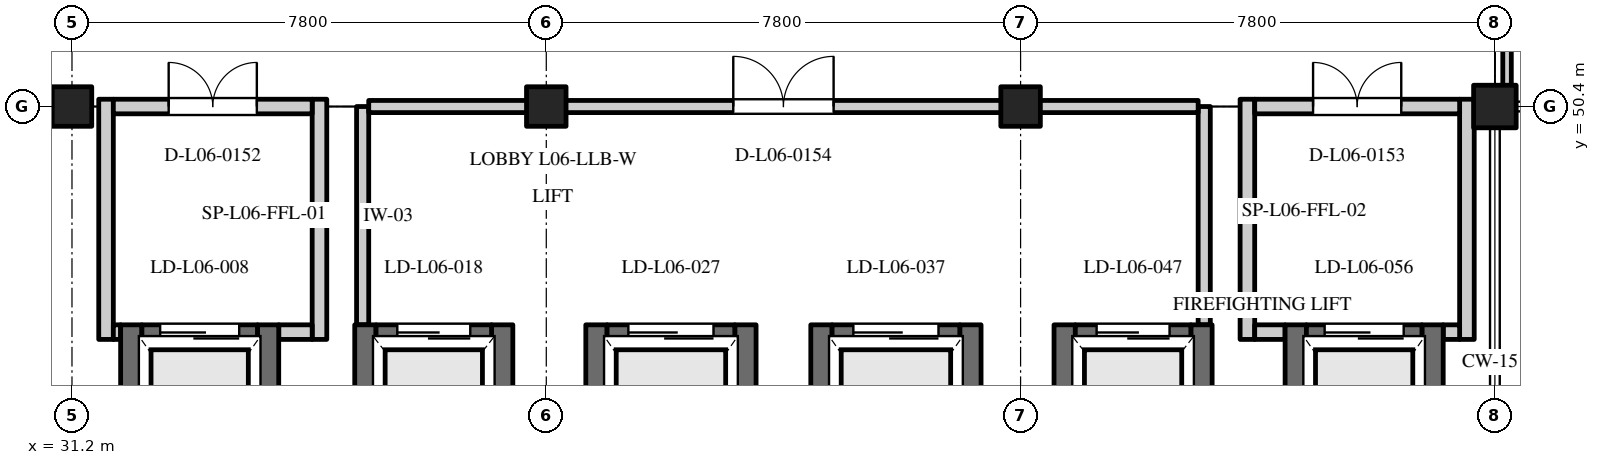
"""IFC4 building model, lengths in metres.
Left out: names, types, materials, properties, quantities, classifications, styles, units other than length and angle.
Written with IfcOpenShell. Run it as: python <this file> out.ifc"""

import sys

from ifc_helpers import new_model, si_unit, direction, frame, frame_2d, origin, origin_2d, place, context, subcontext, project, spatial, rectangle, extrude, element, fill, save


model = new_model("IFC4")
c1 = context("Model", 3, precision=1e-05, world=origin(), true_north=direction((0.0, 1.0)))
c2 = subcontext(c1, "Body", "Model", "MODEL_VIEW")
j1 = project(units=[si_unit("LENGTHUNIT", "METRE"), si_unit("PLANEANGLEUNIT", "RADIAN")], contexts=[c1])
p1 = place(None, origin())
s1 = spatial("IfcSite", under=j1, at=p1, CompositionType="ELEMENT")
p2 = place(p1, origin())
s2 = spatial("IfcBuilding", under=s1, at=p2, CompositionType="ELEMENT")
p3 = place(p2, frame((0.0, 0.0, 26.1)))
s3 = spatial("IfcBuildingStorey", under=s2, at=p3, CompositionType="ELEMENT", Elevation=26.1)
for number, where, z_axis, x_axis in (
    (1, (31.2, 50.4, 0.0), (0.0, 0.0, 1.0), (1.0, 0.0, 0.0)),
    (2, (39.0, 50.4, 0.0), (0.0, 0.0, 1.0), (1.0, 0.0, 0.0)),
    (3, (46.8, 50.4, 0.0), (0.0, 0.0, 1.0), (1.0, 0.0, 0.0)),
):
    element("IfcColumn", number, at=place(p3, frame(where, z_axis=z_axis, x_axis=x_axis)), inside=s3, PredefinedType="COLUMN", context=c2, shape_type="SweptSolid", body=[
        extrude(rectangle(XDim=0.65, YDim=0.65, at=origin_2d()), origin(), (0.0, 0.0, 1.0), 3.6),
    ])
p4 = place(p3, frame((54.6, 50.4, 0.0), z_axis=(0.0, 0.0, 1.0), x_axis=(1.0, 0.0, 0.0)))
e4 = element("IfcColumn", 4, at=p4, inside=s3, PredefinedType="COLUMN", context=c2, shape_type="SweptSolid", body=[
    extrude(rectangle(XDim=0.7, YDim=0.7, at=origin_2d()), origin(), (0.0, 0.0, 1.0), 3.6),
])
for number, where, z_axis, x_axis in (
    (5, (32.175, 43.06, 0.0), (0.0, 0.0, 1.0), (0.0, 1.0, 0.0)),
    (6, (34.425, 43.06, 0.0), (0.0, 0.0, 1.0), (0.0, 1.0, 0.0)),
):
    element("IfcWall", number, at=place(p3, frame(where, z_axis=z_axis, x_axis=x_axis)), inside=s3, PredefinedType="SHEAR", context=c2, shape_type="SweptSolid", body=[
        extrude(rectangle(XDim=3.75, YDim=0.35, at=frame_2d((1.875, 0.0))), origin(), (0.0, 0.0, 1.0), 3.6),
    ])
p5 = place(p3, frame((32.35, 46.635, 0.0), z_axis=(0.0, 0.0, 1.0), x_axis=(1.0, 0.0, 0.0)))
e7 = element("IfcWall", 7, at=p5, inside=s3, PredefinedType="SHEAR", context=c2, shape_type="SweptSolid", body=[
    extrude(rectangle(XDim=1.9, YDim=0.35, at=frame_2d((0.95, 0.0))), origin(), (0.0, 0.0, 1.0), 3.3),
])
p6 = place(p5, frame((0.3, 0.0, 0.0)))
e8 = element("IfcOpeningElement", 8, at=p6, cuts=e7, PredefinedType="OPENING", context=c2, shape_type="SweptSolid", body=[
    extrude(rectangle(XDim=1.3, YDim=2.2, at=frame_2d((0.65, 1.1))), frame((0.0, 0.187, 0.0), z_axis=(0.0, -1.0, 0.0), x_axis=(1.0, 0.0, 0.0)), (0.0, 0.0, 1.0), 0.374),
])
for number, where, z_axis, x_axis in (
    (9, (36.025, 43.36, 0.0), (0.0, 0.0, 1.0), (0.0, 1.0, 0.0)),
    (10, (38.275, 43.36, 0.0), (0.0, 0.0, 1.0), (0.0, 1.0, 0.0)),
):
    element("IfcWall", number, at=place(p3, frame(where, z_axis=z_axis, x_axis=x_axis)), inside=s3, PredefinedType="SHEAR", context=c2, shape_type="SweptSolid", body=[
        extrude(rectangle(XDim=3.45, YDim=0.35, at=frame_2d((1.725, 0.0))), origin(), (0.0, 0.0, 1.0), 3.6),
    ])
p7 = place(p3, frame((36.2, 46.635, 0.0), z_axis=(0.0, 0.0, 1.0), x_axis=(1.0, 0.0, 0.0)))
e11 = element("IfcWall", 11, at=p7, inside=s3, PredefinedType="SHEAR", context=c2, shape_type="SweptSolid", body=[
    extrude(rectangle(XDim=1.9, YDim=0.35, at=frame_2d((0.95, 0.0))), origin(), (0.0, 0.0, 1.0), 3.3),
])
p8 = place(p7, frame((0.35, 0.0, 0.0)))
e12 = element("IfcOpeningElement", 12, at=p8, cuts=e11, PredefinedType="OPENING", context=c2, shape_type="SweptSolid", body=[
    extrude(rectangle(XDim=1.2, YDim=2.2, at=frame_2d((0.6, 1.1))), frame((0.0, 0.187, 0.0), z_axis=(0.0, -1.0, 0.0), x_axis=(1.0, 0.0, 0.0)), (0.0, 0.0, 1.0), 0.374),
])
for number, where, z_axis, x_axis in (
    (13, (39.825, 42.76, 0.0), (0.0, 0.0, 1.0), (0.0, 1.0, 0.0)),
    (14, (42.275, 42.76, 0.0), (0.0, 0.0, 1.0), (0.0, 1.0, 0.0)),
):
    element("IfcWall", number, at=place(p3, frame(where, z_axis=z_axis, x_axis=x_axis)), inside=s3, PredefinedType="SHEAR", context=c2, shape_type="SweptSolid", body=[
        extrude(rectangle(XDim=4.05, YDim=0.35, at=frame_2d((2.025, 0.0))), origin(), (0.0, 0.0, 1.0), 3.6),
    ])
p9 = place(p3, frame((40.0, 46.635, 0.0), z_axis=(0.0, 0.0, 1.0), x_axis=(1.0, 0.0, 0.0)))
e15 = element("IfcWall", 15, at=p9, inside=s3, PredefinedType="SHEAR", context=c2, shape_type="SweptSolid", body=[
    extrude(rectangle(XDim=2.1, YDim=0.35, at=frame_2d((1.05, 0.0))), origin(), (0.0, 0.0, 1.0), 3.3),
])
p10 = place(p9, frame((0.35, 0.0, 0.0)))
e16 = element("IfcOpeningElement", 16, at=p10, cuts=e15, PredefinedType="OPENING", context=c2, shape_type="SweptSolid", body=[
    extrude(rectangle(XDim=1.4, YDim=2.2, at=frame_2d((0.7, 1.1))), frame((0.0, 0.187, 0.0), z_axis=(0.0, -1.0, 0.0), x_axis=(1.0, 0.0, 0.0)), (0.0, 0.0, 1.0), 0.374),
])
for number, where, z_axis, x_axis in (
    (17, (43.525, 42.76, 0.0), (0.0, 0.0, 1.0), (0.0, 1.0, 0.0)),
    (18, (45.975, 42.76, 0.0), (0.0, 0.0, 1.0), (0.0, 1.0, 0.0)),
):
    element("IfcWall", number, at=place(p3, frame(where, z_axis=z_axis, x_axis=x_axis)), inside=s3, PredefinedType="SHEAR", context=c2, shape_type="SweptSolid", body=[
        extrude(rectangle(XDim=4.05, YDim=0.35, at=frame_2d((2.025, 0.0))), origin(), (0.0, 0.0, 1.0), 3.6),
    ])
p11 = place(p3, frame((43.7, 46.635, 0.0), z_axis=(0.0, 0.0, 1.0), x_axis=(1.0, 0.0, 0.0)))
e19 = element("IfcWall", 19, at=p11, inside=s3, PredefinedType="SHEAR", context=c2, shape_type="SweptSolid", body=[
    extrude(rectangle(XDim=2.1, YDim=0.35, at=frame_2d((1.05, 0.0))), origin(), (0.0, 0.0, 1.0), 3.3),
])
p12 = place(p11, frame((0.35, 0.0, 0.0)))
e20 = element("IfcOpeningElement", 20, at=p12, cuts=e19, PredefinedType="OPENING", context=c2, shape_type="SweptSolid", body=[
    extrude(rectangle(XDim=1.4, YDim=2.2, at=frame_2d((0.7, 1.1))), frame((0.0, 0.187, 0.0), z_axis=(0.0, -1.0, 0.0), x_axis=(1.0, 0.0, 0.0)), (0.0, 0.0, 1.0), 0.374),
])
for number, where, z_axis, x_axis in (
    (21, (47.525, 43.36, 0.0), (0.0, 0.0, 1.0), (0.0, 1.0, 0.0)),
    (22, (49.775, 43.36, 0.0), (0.0, 0.0, 1.0), (0.0, 1.0, 0.0)),
):
    element("IfcWall", number, at=place(p3, frame(where, z_axis=z_axis, x_axis=x_axis)), inside=s3, PredefinedType="SHEAR", context=c2, shape_type="SweptSolid", body=[
        extrude(rectangle(XDim=3.45, YDim=0.35, at=frame_2d((1.725, 0.0))), origin(), (0.0, 0.0, 1.0), 3.6),
    ])
p13 = place(p3, frame((47.7, 46.635, 0.0), z_axis=(0.0, 0.0, 1.0), x_axis=(1.0, 0.0, 0.0)))
e23 = element("IfcWall", 23, at=p13, inside=s3, PredefinedType="SHEAR", context=c2, shape_type="SweptSolid", body=[
    extrude(rectangle(XDim=1.9, YDim=0.35, at=frame_2d((0.95, 0.0))), origin(), (0.0, 0.0, 1.0), 3.3),
])
p14 = place(p13, frame((0.35, 0.0, 0.0)))
e24 = element("IfcOpeningElement", 24, at=p14, cuts=e23, PredefinedType="OPENING", context=c2, shape_type="SweptSolid", body=[
    extrude(rectangle(XDim=1.2, YDim=2.2, at=frame_2d((0.6, 1.1))), frame((0.0, 0.187, 0.0), z_axis=(0.0, -1.0, 0.0), x_axis=(1.0, 0.0, 0.0)), (0.0, 0.0, 1.0), 0.374),
])
for number, where, z_axis, x_axis in (
    (25, (51.325, 43.06, 0.0), (0.0, 0.0, 1.0), (0.0, 1.0, 0.0)),
    (26, (53.575, 43.06, 0.0), (0.0, 0.0, 1.0), (0.0, 1.0, 0.0)),
):
    element("IfcWall", number, at=place(p3, frame(where, z_axis=z_axis, x_axis=x_axis)), inside=s3, PredefinedType="SHEAR", context=c2, shape_type="SweptSolid", body=[
        extrude(rectangle(XDim=3.75, YDim=0.35, at=frame_2d((1.875, 0.0))), origin(), (0.0, 0.0, 1.0), 3.6),
    ])
p15 = place(p3, frame((51.5, 46.635, 0.0), z_axis=(0.0, 0.0, 1.0), x_axis=(1.0, 0.0, 0.0)))
e27 = element("IfcWall", 27, at=p15, inside=s3, PredefinedType="SHEAR", context=c2, shape_type="SweptSolid", body=[
    extrude(rectangle(XDim=1.9, YDim=0.35, at=frame_2d((0.95, 0.0))), origin(), (0.0, 0.0, 1.0), 3.3),
])
p16 = place(p15, frame((0.3, 0.0, 0.0)))
e28 = element("IfcOpeningElement", 28, at=p16, cuts=e27, PredefinedType="OPENING", context=c2, shape_type="SweptSolid", body=[
    extrude(rectangle(XDim=1.3, YDim=2.2, at=frame_2d((0.65, 1.1))), frame((0.0, 0.187, 0.0), z_axis=(0.0, -1.0, 0.0), x_axis=(1.0, 0.0, 0.0)), (0.0, 0.0, 1.0), 0.374),
])
for number, where, z_axis, x_axis in (
    (29, (31.76, 46.57, 0.0), (0.0, 0.0, 1.0), (0.0, 1.0, 0.0)),
    (30, (35.27, 46.57, 0.0), (0.0, 0.0, 1.0), (0.0, 1.0, 0.0)),
):
    element("IfcWall", number, at=place(p3, frame(where, z_axis=z_axis, x_axis=x_axis)), inside=s3, PredefinedType="STANDARD", context=c2, shape_type="SweptSolid", body=[
        extrude(rectangle(XDim=3.95, YDim=0.24, at=frame_2d((1.975, 0.0))), origin(), (0.0, 0.0, 1.0), 2.8),
    ])
p17 = place(p3, frame((31.88, 46.69, 0.0), z_axis=(0.0, 0.0, 1.0), x_axis=(1.0, 0.0, 0.0)))
e31 = element("IfcWall", 31, at=p17, inside=s3, PredefinedType="STANDARD", context=c2, shape_type="SweptSolid", body=[
    extrude(rectangle(XDim=0.12, YDim=0.24, at=frame_2d((0.06, 0.0))), origin(), (0.0, 0.0, 1.0), 2.8),
])
p18 = place(p3, frame((34.6, 46.69, 0.0), z_axis=(0.0, 0.0, 1.0), x_axis=(1.0, 0.0, 0.0)))
e32 = element("IfcWall", 32, at=p18, inside=s3, PredefinedType="STANDARD", context=c2, shape_type="SweptSolid", body=[
    extrude(rectangle(XDim=0.55, YDim=0.24, at=frame_2d((0.275, 0.0))), origin(), (0.0, 0.0, 1.0), 2.8),
])
p19 = place(p3, frame((31.88, 50.4, 0.0), z_axis=(0.0, 0.0, 1.0), x_axis=(1.0, 0.0, 0.0)))
e33 = element("IfcWall", 33, at=p19, inside=s3, PredefinedType="STANDARD", context=c2, shape_type="SweptSolid", body=[
    extrude(rectangle(XDim=3.27, YDim=0.24, at=frame_2d((1.635, 0.0))), origin(), (0.0, 0.0, 1.0), 2.8),
])
p20 = place(p19, frame((0.91, 0.0, 0.0)))
e34 = element("IfcOpeningElement", 34, at=p20, cuts=e33, PredefinedType="OPENING", context=c2, shape_type="SweptSolid", body=[
    extrude(rectangle(XDim=1.45, YDim=2.2, at=frame_2d((0.725, 1.1))), frame((0.0, 0.132, 0.0), z_axis=(0.0, -1.0, 0.0), x_axis=(1.0, 0.0, 0.0)), (0.0, 0.0, 1.0), 0.264),
])
for number, where, z_axis, x_axis in (
    (35, (50.53, 46.57, 0.0), (0.0, 0.0, 1.0), (0.0, 1.0, 0.0)),
    (36, (54.14, 46.57, 0.0), (0.0, 0.0, 1.0), (0.0, 1.0, 0.0)),
):
    element("IfcWall", number, at=place(p3, frame(where, z_axis=z_axis, x_axis=x_axis)), inside=s3, PredefinedType="STANDARD", context=c2, shape_type="SweptSolid", body=[
        extrude(rectangle(XDim=3.95, YDim=0.24, at=frame_2d((1.975, 0.0))), origin(), (0.0, 0.0, 1.0), 2.8),
    ])
p21 = place(p3, frame((50.65, 46.69, 0.0), z_axis=(0.0, 0.0, 1.0), x_axis=(1.0, 0.0, 0.0)))
e37 = element("IfcWall", 37, at=p21, inside=s3, PredefinedType="STANDARD", context=c2, shape_type="SweptSolid", body=[
    extrude(rectangle(XDim=0.5, YDim=0.24, at=frame_2d((0.25, 0.0))), origin(), (0.0, 0.0, 1.0), 2.8),
])
p22 = place(p3, frame((53.75, 46.69, 0.0), z_axis=(0.0, 0.0, 1.0), x_axis=(1.0, 0.0, 0.0)))
e38 = element("IfcWall", 38, at=p22, inside=s3, PredefinedType="STANDARD", context=c2, shape_type="SweptSolid", body=[
    extrude(rectangle(XDim=0.27, YDim=0.24, at=frame_2d((0.135, 0.0))), origin(), (0.0, 0.0, 1.0), 2.8),
])
p23 = place(p3, frame((50.65, 50.4, 0.0), z_axis=(0.0, 0.0, 1.0), x_axis=(1.0, 0.0, 0.0)))
e39 = element("IfcWall", 39, at=p23, inside=s3, PredefinedType="STANDARD", context=c2, shape_type="SweptSolid", body=[
    extrude(rectangle(XDim=3.37, YDim=0.24, at=frame_2d((1.685, 0.0))), origin(), (0.0, 0.0, 1.0), 2.8),
])
p24 = place(p23, frame((0.96, 0.0, 0.0)))
e40 = element("IfcOpeningElement", 40, at=p24, cuts=e39, PredefinedType="OPENING", context=c2, shape_type="SweptSolid", body=[
    extrude(rectangle(XDim=1.45, YDim=2.2, at=frame_2d((0.725, 1.1))), frame((0.0, 0.132, 0.0), z_axis=(0.0, -1.0, 0.0), x_axis=(1.0, 0.0, 0.0)), (0.0, 0.0, 1.0), 0.264),
])
for number, where, z_axis, x_axis in (
    (41, (35.98, 46.81, 0.0), (0.0, 0.0, 1.0), (0.0, 1.0, 0.0)),
    (42, (49.82, 46.81, 0.0), (0.0, 0.0, 1.0), (0.0, 1.0, 0.0)),
):
    element("IfcWall", number, at=place(p3, frame(where, z_axis=z_axis, x_axis=x_axis)), inside=s3, PredefinedType="STANDARD", context=c2, shape_type="SweptSolid", body=[
        extrude(rectangle(XDim=3.59, YDim=0.2, at=frame_2d((1.795, 0.0))), origin(), (0.0, 0.0, 1.0), 2.8),
    ])
p25 = place(p3, frame((36.08, 50.4, 0.0), z_axis=(0.0, 0.0, 1.0), x_axis=(1.0, 0.0, 0.0)))
e43 = element("IfcWall", 43, at=p25, inside=s3, PredefinedType="STANDARD", context=c2, shape_type="SweptSolid", body=[
    extrude(rectangle(XDim=13.64, YDim=0.2, at=frame_2d((6.82, 0.0))), origin(), (0.0, 0.0, 1.0), 2.8),
])
p26 = place(p25, frame((5.995, 0.0, 0.0)))
e44 = element("IfcOpeningElement", 44, at=p26, cuts=e43, PredefinedType="OPENING", context=c2, shape_type="SweptSolid", body=[
    extrude(rectangle(XDim=1.65, YDim=2.25, at=frame_2d((0.825, 1.125))), frame((0.0, 0.112, 0.0), z_axis=(0.0, -1.0, 0.0), x_axis=(1.0, 0.0, 0.0)), (0.0, 0.0, 1.0), 0.224),
])
p27 = place(p3, frame((54.8, 50.485, 0.0), z_axis=(0.0, 0.0, 1.0), x_axis=(0.0, 1.0, 0.0)))
e45 = element("IfcWall", 45, at=p27, inside=s3, PredefinedType="PARTITIONING", context=c2, shape_type="SweptSolid", body=[
    extrude(rectangle(XDim=3.56, YDim=0.14, at=frame_2d((1.78, 0.0))), origin(), (0.0, 0.0, 1.0), 2.65),
])
p28 = place(p6, origin())
e46 = element("IfcDoor", 46, at=p28, inside=s3, OperationType="SLIDING_TO_LEFT", PredefinedType="DOOR", context=c2, shape_type="SweptSolid", body=[
    extrude(rectangle(XDim=1.3, YDim=2.2, at=frame_2d((0.65, 1.1))), frame((0.0, 0.025, 0.0), z_axis=(0.0, -1.0, 0.0), x_axis=(1.0, 0.0, 0.0)), (0.0, 0.0, 1.0), 0.05),
])
fill(e8, e46)
p29 = place(p8, origin())
e47 = element("IfcDoor", 47, at=p29, inside=s3, OperationType="SLIDING_TO_LEFT", PredefinedType="DOOR", context=c2, shape_type="SweptSolid", body=[
    extrude(rectangle(XDim=1.2, YDim=2.2, at=frame_2d((0.6, 1.1))), frame((0.0, 0.025, 0.0), z_axis=(0.0, -1.0, 0.0), x_axis=(1.0, 0.0, 0.0)), (0.0, 0.0, 1.0), 0.05),
])
fill(e12, e47)
p30 = place(p10, origin())
e48 = element("IfcDoor", 48, at=p30, inside=s3, OperationType="SLIDING_TO_LEFT", PredefinedType="DOOR", context=c2, shape_type="SweptSolid", body=[
    extrude(rectangle(XDim=1.4, YDim=2.2, at=frame_2d((0.7, 1.1))), frame((0.0, 0.025, 0.0), z_axis=(0.0, -1.0, 0.0), x_axis=(1.0, 0.0, 0.0)), (0.0, 0.0, 1.0), 0.05),
])
fill(e16, e48)
p31 = place(p12, origin())
e49 = element("IfcDoor", 49, at=p31, inside=s3, OperationType="SLIDING_TO_LEFT", PredefinedType="DOOR", context=c2, shape_type="SweptSolid", body=[
    extrude(rectangle(XDim=1.4, YDim=2.2, at=frame_2d((0.7, 1.1))), frame((0.0, 0.025, 0.0), z_axis=(0.0, -1.0, 0.0), x_axis=(1.0, 0.0, 0.0)), (0.0, 0.0, 1.0), 0.05),
])
fill(e20, e49)
p32 = place(p14, origin())
e50 = element("IfcDoor", 50, at=p32, inside=s3, OperationType="SLIDING_TO_LEFT", PredefinedType="DOOR", context=c2, shape_type="SweptSolid", body=[
    extrude(rectangle(XDim=1.2, YDim=2.2, at=frame_2d((0.6, 1.1))), frame((0.0, 0.025, 0.0), z_axis=(0.0, -1.0, 0.0), x_axis=(1.0, 0.0, 0.0)), (0.0, 0.0, 1.0), 0.05),
])
fill(e24, e50)
p33 = place(p16, origin())
e51 = element("IfcDoor", 51, at=p33, inside=s3, OperationType="SLIDING_TO_LEFT", PredefinedType="DOOR", context=c2, shape_type="SweptSolid", body=[
    extrude(rectangle(XDim=1.3, YDim=2.2, at=frame_2d((0.65, 1.1))), frame((0.0, 0.025, 0.0), z_axis=(0.0, -1.0, 0.0), x_axis=(1.0, 0.0, 0.0)), (0.0, 0.0, 1.0), 0.05),
])
fill(e28, e51)
p34 = place(p20, origin())
e52 = element("IfcDoor", 52, at=p34, inside=s3, OperationType="DOUBLE_DOOR_SINGLE_SWING", PredefinedType="DOOR", context=c2, shape_type="SweptSolid", body=[
    extrude(rectangle(XDim=1.45, YDim=2.2, at=frame_2d((0.725, 1.1))), frame((0.0, 0.025, 0.0), z_axis=(0.0, -1.0, 0.0), x_axis=(1.0, 0.0, 0.0)), (0.0, 0.0, 1.0), 0.05),
])
fill(e34, e52)
p35 = place(p24, origin())
e53 = element("IfcDoor", 53, at=p35, inside=s3, OperationType="DOUBLE_DOOR_SINGLE_SWING", PredefinedType="DOOR", context=c2, shape_type="SweptSolid", body=[
    extrude(rectangle(XDim=1.45, YDim=2.2, at=frame_2d((0.725, 1.1))), frame((0.0, 0.025, 0.0), z_axis=(0.0, -1.0, 0.0), x_axis=(1.0, 0.0, 0.0)), (0.0, 0.0, 1.0), 0.05),
])
fill(e40, e53)
p36 = place(p26, origin())
e54 = element("IfcDoor", 54, at=p36, inside=s3, OperationType="DOUBLE_DOOR_SINGLE_SWING", PredefinedType="DOOR", context=c2, shape_type="SweptSolid", body=[
    extrude(rectangle(XDim=1.65, YDim=2.25, at=frame_2d((0.825, 1.125))), frame((0.0, 0.025, 0.0), z_axis=(0.0, -1.0, 0.0), x_axis=(1.0, 0.0, 0.0)), (0.0, 0.0, 1.0), 0.05),
])
fill(e44, e54)
save(model, sys.argv[1])
